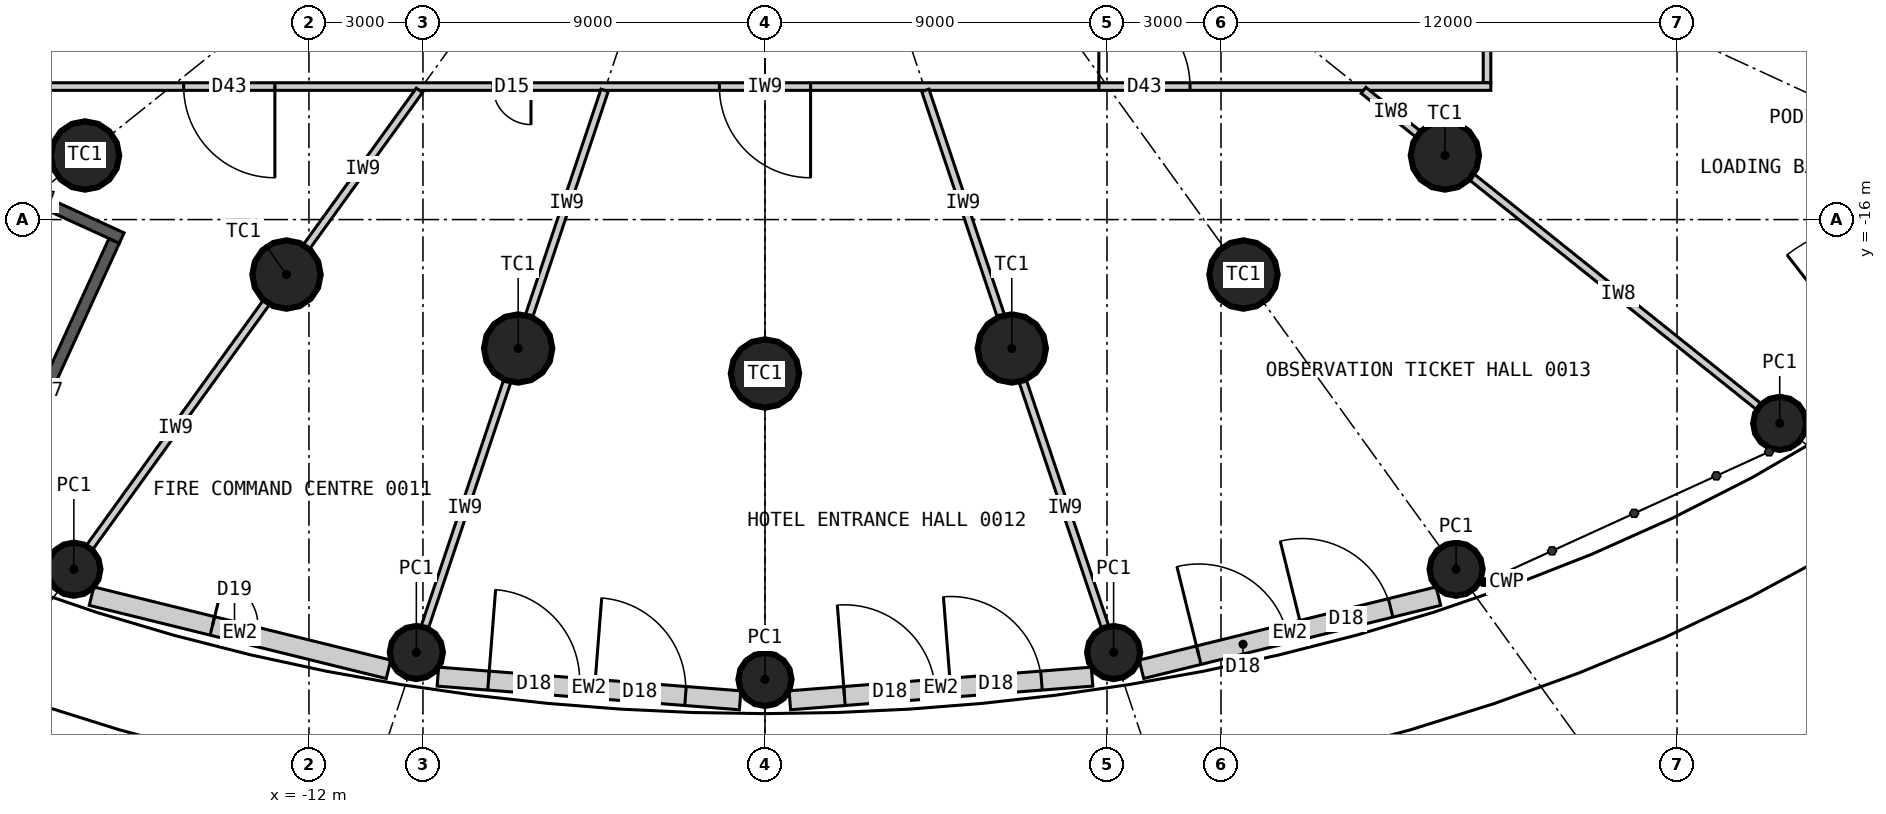
"""IFC4 building model, lengths in metres.
Left out: names, types, materials, properties, quantities, classifications, styles, units other than length and angle.
Written with IfcOpenShell. Run it as: python <this file> out.ifc"""

import sys

from ifc_helpers import new_model, si_unit, direction, frame, frame_2d, origin, origin_2d, place, context, subcontext, project, spatial, rectangle, circle, extrude, element, fill, save


model = new_model("IFC4")
c1 = context("Model", 3, precision=1e-05, world=origin(), true_north=direction((0.0, 1.0)))
c2 = subcontext(c1, "Body", "Model", "MODEL_VIEW")
j1 = project(units=[si_unit("LENGTHUNIT", "METRE"), si_unit("PLANEANGLEUNIT", "RADIAN")], contexts=[c1])
p1 = place(None, origin())
s1 = spatial("IfcSite", under=j1, at=p1, CompositionType="ELEMENT")
p2 = place(p1, origin())
s2 = spatial("IfcBuilding", under=s1, at=p2, CompositionType="ELEMENT")
p3 = place(p2, origin())
s3 = spatial("IfcBuildingStorey", under=s2, at=p3, CompositionType="ELEMENT", Elevation=0.0)
for number, where, z_axis, x_axis in (
    (1, (-17.892, -14.313, 0.0), (0.0, 0.0, 1.0), (1.0, 0.0, 0.0)),
    (2, (-12.591, -17.447, 0.0), (0.0, 0.0, 1.0), (1.0, 0.0, 0.0)),
    (3, (-6.495, -19.391, 0.0), (0.0, 0.0, 1.0), (1.0, 0.0, 0.0)),
    (4, (0.0, -20.05, 0.0), (0.0, 0.0, 1.0), (1.0, 0.0, 0.0)),
    (5, (6.495, -19.391, 0.0), (0.0, 0.0, 1.0), (1.0, 0.0, 0.0)),
    (6, (12.591, -17.447, 0.0), (0.0, 0.0, 1.0), (1.0, 0.0, 0.0)),
    (7, (17.892, -14.313, 0.0), (0.0, 0.0, 1.0), (1.0, 0.0, 0.0)),
):
    element("IfcColumn", number, at=place(p3, frame(where, z_axis=z_axis, x_axis=x_axis)), inside=s3, PredefinedType="COLUMN", context=c2, shape_type="SweptSolid", body=[
        extrude(circle(Radius=0.9, at=origin_2d()), origin(), (0.0, 0.0, 1.0), 7.2),
    ])
for number, where, z_axis, x_axis in (
    (8, (-18.186, -25.199, 0.0), (0.0, 0.0, 1.0), (1.0, 0.0, 0.0)),
    (9, (-9.174, -27.391, 0.0), (0.0, 0.0, 1.0), (1.0, 0.0, 0.0)),
    (10, (0.0, -28.1, 0.0), (0.0, 0.0, 1.0), (1.0, 0.0, 0.0)),
    (11, (9.174, -27.391, 0.0), (0.0, 0.0, 1.0), (1.0, 0.0, 0.0)),
    (12, (18.186, -25.199, 0.0), (0.0, 0.0, 1.0), (1.0, 0.0, 0.0)),
    (13, (26.702, -21.362, 0.0), (0.0, 0.0, 1.0), (1.0, 0.0, 0.0)),
):
    element("IfcColumn", number, at=place(p3, frame(where, z_axis=z_axis, x_axis=x_axis)), inside=s3, PredefinedType="COLUMN", context=c2, shape_type="SweptSolid", body=[
        extrude(circle(Radius=0.7, at=origin_2d()), origin(), (0.0, 0.0, 1.0), 7.2),
    ])
p4 = place(p3, frame((-17.721, -25.908, 0.0), z_axis=(0.0, 0.0, 1.0), x_axis=(0.970964815964, -0.23922233625, 0.0)))
e14 = element("IfcWall", 14, at=p4, inside=s3, PredefinedType="SOLIDWALL", context=c2, shape_type="SweptSolid", body=[
    extrude(rectangle(XDim=8.048, YDim=0.5, at=frame_2d((4.024, 0.0))), origin(), (0.0, 0.0, 1.0), 6.95),
])
p5 = place(p4, frame((3.275, 0.0, 0.0)))
e15 = element("IfcOpeningElement", 15, at=p5, cuts=e14, PredefinedType="OPENING", context=c2, shape_type="SweptSolid", body=[
    extrude(rectangle(XDim=1.2, YDim=2.4, at=frame_2d((0.6, 1.2))), frame((0.0, 0.26, 0.0), z_axis=(0.0, -1.0, 0.0), x_axis=(1.0, 0.0, 0.0)), (0.0, 0.0, 1.0), 0.52),
])
p6 = place(p3, frame((-8.608, -28.026, 0.0), z_axis=(0.0, 0.0, 1.0), x_axis=(0.996950620384, -0.078034995456, 0.0)))
e16 = element("IfcWall", 16, at=p6, inside=s3, PredefinedType="SOLIDWALL", context=c2, shape_type="SweptSolid", body=[
    extrude(rectangle(XDim=7.978, YDim=0.5, at=frame_2d((3.989, 0.0))), origin(), (0.0, 0.0, 1.0), 6.95),
])
p7 = place(p6, frame((1.336, 0.0, 0.0)))
e17 = element("IfcOpeningElement", 17, at=p7, cuts=e16, PredefinedType="OPENING", context=c2, shape_type="SweptSolid", body=[
    extrude(rectangle(XDim=2.4, YDim=3.0, at=frame_2d((1.2, 1.5))), frame((0.0, 0.26, 0.0), z_axis=(0.0, -1.0, 0.0), x_axis=(1.0, 0.0, 0.0)), (0.0, 0.0, 1.0), 0.52),
])
p8 = place(p6, frame((4.136, 0.0, 0.0)))
e18 = element("IfcOpeningElement", 18, at=p8, cuts=e16, PredefinedType="OPENING", context=c2, shape_type="SweptSolid", body=[
    extrude(rectangle(XDim=2.4, YDim=3.0, at=frame_2d((1.2, 1.5))), frame((0.0, 0.26, 0.0), z_axis=(0.0, -1.0, 0.0), x_axis=(1.0, 0.0, 0.0)), (0.0, 0.0, 1.0), 0.52),
])
p9 = place(p3, frame((0.654, -28.649, 0.0), z_axis=(0.0, 0.0, 1.0), x_axis=(0.996950620384, 0.078034995456, 0.0)))
e19 = element("IfcWall", 19, at=p9, inside=s3, PredefinedType="SOLIDWALL", context=c2, shape_type="SweptSolid", body=[
    extrude(rectangle(XDim=7.978, YDim=0.5, at=frame_2d((3.989, 0.0))), origin(), (0.0, 0.0, 1.0), 6.95),
])
p10 = place(p9, frame((1.442, 0.0, 0.0)))
e20 = element("IfcOpeningElement", 20, at=p10, cuts=e19, PredefinedType="OPENING", context=c2, shape_type="SweptSolid", body=[
    extrude(rectangle(XDim=2.4, YDim=3.0, at=frame_2d((1.2, 1.5))), frame((0.0, 0.26, 0.0), z_axis=(0.0, -1.0, 0.0), x_axis=(1.0, 0.0, 0.0)), (0.0, 0.0, 1.0), 0.52),
])
p11 = place(p9, frame((4.242, 0.0, 0.0)))
e21 = element("IfcOpeningElement", 21, at=p11, cuts=e19, PredefinedType="OPENING", context=c2, shape_type="SweptSolid", body=[
    extrude(rectangle(XDim=2.4, YDim=3.0, at=frame_2d((1.2, 1.5))), frame((0.0, 0.26, 0.0), z_axis=(0.0, -1.0, 0.0), x_axis=(1.0, 0.0, 0.0)), (0.0, 0.0, 1.0), 0.52),
])
p12 = place(p3, frame((9.907, -27.833, 0.0), z_axis=(0.0, 0.0, 1.0), x_axis=(0.970964815964, 0.23922233625, 0.0)))
e22 = element("IfcWall", 22, at=p12, inside=s3, PredefinedType="SOLIDWALL", context=c2, shape_type="SweptSolid", body=[
    extrude(rectangle(XDim=8.048, YDim=0.5, at=frame_2d((4.024, 0.0))), origin(), (0.0, 0.0, 1.0), 6.95),
])
p13 = place(p12, frame((1.553, 0.0, 0.0)))
e23 = element("IfcOpeningElement", 23, at=p13, cuts=e22, PredefinedType="OPENING", context=c2, shape_type="SweptSolid", body=[
    extrude(rectangle(XDim=2.4, YDim=3.0, at=frame_2d((1.2, 1.5))), frame((0.0, 0.26, 0.0), z_axis=(0.0, -1.0, 0.0), x_axis=(1.0, 0.0, 0.0)), (0.0, 0.0, 1.0), 0.52),
])
p14 = place(p12, frame((4.353, 0.0, 0.0)))
e24 = element("IfcOpeningElement", 24, at=p14, cuts=e22, PredefinedType="OPENING", context=c2, shape_type="SweptSolid", body=[
    extrude(rectangle(XDim=2.4, YDim=3.0, at=frame_2d((1.2, 1.5))), frame((0.0, 0.26, 0.0), z_axis=(0.0, -1.0, 0.0), x_axis=(1.0, 0.0, 0.0)), (0.0, 0.0, 1.0), 0.52),
])
p15 = place(p3, frame((19.0, -12.4, 0.0), z_axis=(0.0, 0.0, 1.0), x_axis=(0.0, 1.0, 0.0)))
e25 = element("IfcWall", 25, at=p15, inside=s3, PredefinedType="PARTITIONING", context=c2, shape_type="SweptSolid", body=[
    extrude(rectangle(XDim=24.8, YDim=0.2, at=frame_2d((12.4, 0.0))), origin(), (0.0, 0.0, 1.0), 6.95),
])
p16 = place(p15, frame((11.2, 0.0, 0.0)))
e26 = element("IfcOpeningElement", 26, at=p16, cuts=e25, PredefinedType="OPENING", context=c2, shape_type="SweptSolid", body=[
    extrude(rectangle(XDim=2.4, YDim=3.0, at=frame_2d((1.2, 1.5))), frame((0.0, 0.11, 0.0), z_axis=(0.0, -1.0, 0.0), x_axis=(1.0, 0.0, 0.0)), (0.0, 0.0, 1.0), 0.22),
])
p17 = place(p15, frame((3.153, 0.0, 0.0)))
e27 = element("IfcOpeningElement", 27, at=p17, cuts=e25, PredefinedType="OPENING", context=c2, shape_type="SweptSolid", body=[
    extrude(rectangle(XDim=1.8, YDim=2.4, at=frame_2d((0.9, 1.2))), frame((0.0, 0.11, 0.0), z_axis=(0.0, -1.0, 0.0), x_axis=(1.0, 0.0, 0.0)), (0.0, 0.0, 1.0), 0.22),
])
p18 = place(p15, frame((17.094, 0.0, 0.0)))
e28 = element("IfcOpeningElement", 28, at=p18, cuts=e25, PredefinedType="OPENING", context=c2, shape_type="SweptSolid", body=[
    extrude(rectangle(XDim=1.8, YDim=2.4, at=frame_2d((0.9, 1.2))), frame((0.0, 0.11, 0.0), z_axis=(0.0, -1.0, 0.0), x_axis=(1.0, 0.0, 0.0)), (0.0, 0.0, 1.0), 0.22),
])
p19 = place(p3, frame((19.1, -12.5, 0.0), z_axis=(0.0, 0.0, 1.0), x_axis=(-1.0, 0.0, 0.0)))
e29 = element("IfcWall", 29, at=p19, inside=s3, PredefinedType="PARTITIONING", context=c2, shape_type="SweptSolid", body=[
    extrude(rectangle(XDim=38.2, YDim=0.2, at=frame_2d((19.1, 0.0))), origin(), (0.0, 0.0, 1.0), 6.95),
])
p20 = place(p19, frame((31.997, 0.0, 0.0)))
e30 = element("IfcOpeningElement", 30, at=p20, cuts=e29, PredefinedType="OPENING", context=c2, shape_type="SweptSolid", body=[
    extrude(rectangle(XDim=2.4, YDim=3.0, at=frame_2d((1.2, 1.5))), frame((0.0, 0.11, 0.0), z_axis=(0.0, -1.0, 0.0), x_axis=(1.0, 0.0, 0.0)), (0.0, 0.0, 1.0), 0.22),
])
p21 = place(p19, frame((25.257, 0.0, 0.0)))
e31 = element("IfcOpeningElement", 31, at=p21, cuts=e29, PredefinedType="OPENING", context=c2, shape_type="SweptSolid", body=[
    extrude(rectangle(XDim=1.0, YDim=2.2, at=frame_2d((0.5, 1.1))), frame((0.0, 0.11, 0.0), z_axis=(0.0, -1.0, 0.0), x_axis=(1.0, 0.0, 0.0)), (0.0, 0.0, 1.0), 0.22),
])
p22 = place(p19, frame((17.9, 0.0, 0.0)))
e32 = element("IfcOpeningElement", 32, at=p22, cuts=e29, PredefinedType="OPENING", context=c2, shape_type="SweptSolid", body=[
    extrude(rectangle(XDim=2.4, YDim=3.0, at=frame_2d((1.2, 1.5))), frame((0.0, 0.11, 0.0), z_axis=(0.0, -1.0, 0.0), x_axis=(1.0, 0.0, 0.0)), (0.0, 0.0, 1.0), 0.22),
])
p23 = place(p19, frame((7.915, 0.0, 0.0)))
e33 = element("IfcOpeningElement", 33, at=p23, cuts=e29, PredefinedType="OPENING", context=c2, shape_type="SweptSolid", body=[
    extrude(rectangle(XDim=2.4, YDim=3.0, at=frame_2d((1.2, 1.5))), frame((0.0, 0.11, 0.0), z_axis=(0.0, -1.0, 0.0), x_axis=(1.0, 0.0, 0.0)), (0.0, 0.0, 1.0), 0.22),
])
p24 = place(p3, frame((-9.093, -12.6, 0.0), z_axis=(0.0, 0.0, 1.0), x_axis=(-0.58522538525, -0.810870673079, 0.0)))
e34 = element("IfcWall", 34, at=p24, inside=s3, PredefinedType="PARTITIONING", context=c2, shape_type="SweptSolid", body=[
    extrude(rectangle(XDim=5.077, YDim=0.2, at=frame_2d((2.538, 0.0))), origin(), (0.0, 0.0, 1.0), 6.1),
])
p25 = place(p3, frame((-13.118, -18.176, 0.0), z_axis=(0.0, 0.0, 1.0), x_axis=(-0.585204349301, -0.810885854828, 0.0)))
e35 = element("IfcWall", 35, at=p25, inside=s3, PredefinedType="PARTITIONING", context=c2, shape_type="SweptSolid", body=[
    extrude(rectangle(XDim=8.161, YDim=0.2, at=frame_2d((4.081, 0.0))), origin(), (0.0, 0.0, 1.0), 6.05),
])
p26 = place(p3, frame((-4.22, -12.6, 0.0), z_axis=(0.0, 0.0, 1.0), x_axis=(-0.317584173452, -0.9482300843, 0.0)))
e36 = element("IfcWall", 36, at=p26, inside=s3, PredefinedType="PARTITIONING", context=c2, shape_type="SweptSolid", body=[
    extrude(rectangle(XDim=6.262, YDim=0.2, at=frame_2d((3.131, 0.0))), origin(), (0.0, 0.0, 1.0), 6.1),
])
p27 = place(p3, frame((-6.781, -20.245, 0.0), z_axis=(0.0, 0.0, 1.0), x_axis=(-0.317580622989, -0.948231273425, 0.0)))
e37 = element("IfcWall", 37, at=p27, inside=s3, PredefinedType="PARTITIONING", context=c2, shape_type="SweptSolid", body=[
    extrude(rectangle(XDim=7.036, YDim=0.2, at=frame_2d((3.518, 0.0))), origin(), (0.0, 0.0, 1.0), 6.05),
])
p28 = place(p3, frame((4.22, -12.6, 0.0), z_axis=(0.0, 0.0, 1.0), x_axis=(0.317584173452, -0.9482300843, 0.0)))
e38 = element("IfcWall", 38, at=p28, inside=s3, PredefinedType="PARTITIONING", context=c2, shape_type="SweptSolid", body=[
    extrude(rectangle(XDim=6.262, YDim=0.2, at=frame_2d((3.131, 0.0))), origin(), (0.0, 0.0, 1.0), 6.1),
])
p29 = place(p3, frame((6.781, -20.245, 0.0), z_axis=(0.0, 0.0, 1.0), x_axis=(0.317580622989, -0.948231273425, 0.0)))
e39 = element("IfcWall", 39, at=p29, inside=s3, PredefinedType="PARTITIONING", context=c2, shape_type="SweptSolid", body=[
    extrude(rectangle(XDim=7.036, YDim=0.2, at=frame_2d((3.518, 0.0))), origin(), (0.0, 0.0, 1.0), 6.05),
])
p30 = place(p3, frame((15.75, -12.6, 0.0), z_axis=(0.0, 0.0, 1.0), x_axis=(0.780881734892, -0.6246788904, 0.0)))
e40 = element("IfcWall", 40, at=p30, inside=s3, PredefinedType="PARTITIONING", context=c2, shape_type="SweptSolid", body=[
    extrude(rectangle(XDim=1.843, YDim=0.2, at=frame_2d((0.921, 0.0))), origin(), (0.0, 0.0, 1.0), 6.1),
])
p31 = place(p3, frame((18.594, -14.875, 0.0), z_axis=(0.0, 0.0, 1.0), x_axis=(0.780868809443, -0.624695047554, 0.0)))
e41 = element("IfcWall", 41, at=p31, inside=s3, PredefinedType="PARTITIONING", context=c2, shape_type="SweptSolid", body=[
    extrude(rectangle(XDim=9.883, YDim=0.2, at=frame_2d((4.941, 0.0))), origin(), (0.0, 0.0, 1.0), 6.05),
])
p32 = place(p3, frame((-20.722, -24.437, 0.0), z_axis=(0.0, 0.0, 1.0), x_axis=(0.415348644036, 0.909662302119, 0.0)))
e42 = element("IfcWall", 42, at=p32, inside=s3, PredefinedType="SHEAR", context=c2, shape_type="SweptSolid", body=[
    extrude(rectangle(XDim=8.66, YDim=0.3, at=frame_2d((4.33, 0.0))), origin(), (0.0, 0.0, 1.0), 6.95),
])
p33 = place(p3, frame((-21.293, -14.492, 0.0), z_axis=(0.0, 0.0, 1.0), x_axis=(0.90966669911, -0.415339013975, 0.0)))
e43 = element("IfcWall", 43, at=p33, inside=s3, PredefinedType="SHEAR", context=c2, shape_type="SweptSolid", body=[
    extrude(rectangle(XDim=4.8, YDim=0.3, at=frame_2d((2.4, 0.0))), origin(), (0.0, 0.0, 1.0), 6.95),
])
p34 = place(p5, origin())
e44 = element("IfcDoor", 44, at=p34, inside=s3, OperationType="SINGLE_SWING_LEFT", PredefinedType="DOOR", context=c2, shape_type="SweptSolid", body=[
    extrude(rectangle(XDim=1.2, YDim=2.4, at=frame_2d((0.6, 1.2))), frame((0.0, 0.025, 0.0), z_axis=(0.0, -1.0, 0.0), x_axis=(1.0, 0.0, 0.0)), (0.0, 0.0, 1.0), 0.05),
])
fill(e15, e44)
p35 = place(p7, origin())
e45 = element("IfcDoor", 45, at=p35, inside=s3, OperationType="DOUBLE_DOOR_DOUBLE_SWING", PredefinedType="DOOR", context=c2, shape_type="SweptSolid", body=[
    extrude(rectangle(XDim=2.4, YDim=3.0, at=frame_2d((1.2, 1.5))), frame((0.0, 0.025, 0.0), z_axis=(0.0, -1.0, 0.0), x_axis=(1.0, 0.0, 0.0)), (0.0, 0.0, 1.0), 0.05),
])
fill(e17, e45)
p36 = place(p8, origin())
e46 = element("IfcDoor", 46, at=p36, inside=s3, OperationType="DOUBLE_DOOR_DOUBLE_SWING", PredefinedType="DOOR", context=c2, shape_type="SweptSolid", body=[
    extrude(rectangle(XDim=2.4, YDim=3.0, at=frame_2d((1.2, 1.5))), frame((0.0, 0.025, 0.0), z_axis=(0.0, -1.0, 0.0), x_axis=(1.0, 0.0, 0.0)), (0.0, 0.0, 1.0), 0.05),
])
fill(e18, e46)
p37 = place(p10, origin())
e47 = element("IfcDoor", 47, at=p37, inside=s3, OperationType="DOUBLE_DOOR_DOUBLE_SWING", PredefinedType="DOOR", context=c2, shape_type="SweptSolid", body=[
    extrude(rectangle(XDim=2.4, YDim=3.0, at=frame_2d((1.2, 1.5))), frame((0.0, 0.025, 0.0), z_axis=(0.0, -1.0, 0.0), x_axis=(1.0, 0.0, 0.0)), (0.0, 0.0, 1.0), 0.05),
])
fill(e20, e47)
p38 = place(p11, origin())
e48 = element("IfcDoor", 48, at=p38, inside=s3, OperationType="DOUBLE_DOOR_DOUBLE_SWING", PredefinedType="DOOR", context=c2, shape_type="SweptSolid", body=[
    extrude(rectangle(XDim=2.4, YDim=3.0, at=frame_2d((1.2, 1.5))), frame((0.0, 0.025, 0.0), z_axis=(0.0, -1.0, 0.0), x_axis=(1.0, 0.0, 0.0)), (0.0, 0.0, 1.0), 0.05),
])
fill(e21, e48)
p39 = place(p13, origin())
e49 = element("IfcDoor", 49, at=p39, inside=s3, OperationType="DOUBLE_DOOR_DOUBLE_SWING", PredefinedType="DOOR", context=c2, shape_type="SweptSolid", body=[
    extrude(rectangle(XDim=2.4, YDim=3.0, at=frame_2d((1.2, 1.5))), frame((0.0, 0.025, 0.0), z_axis=(0.0, -1.0, 0.0), x_axis=(1.0, 0.0, 0.0)), (0.0, 0.0, 1.0), 0.05),
])
fill(e23, e49)
p40 = place(p14, origin())
e50 = element("IfcDoor", 50, at=p40, inside=s3, OperationType="DOUBLE_DOOR_DOUBLE_SWING", PredefinedType="DOOR", context=c2, shape_type="SweptSolid", body=[
    extrude(rectangle(XDim=2.4, YDim=3.0, at=frame_2d((1.2, 1.5))), frame((0.0, 0.025, 0.0), z_axis=(0.0, -1.0, 0.0), x_axis=(1.0, 0.0, 0.0)), (0.0, 0.0, 1.0), 0.05),
])
fill(e24, e50)
p41 = place(p20, origin())
e51 = element("IfcDoor", 51, at=p41, inside=s3, OperationType="DOUBLE_DOOR_DOUBLE_SWING", PredefinedType="DOOR", context=c2, shape_type="SweptSolid", body=[
    extrude(rectangle(XDim=2.4, YDim=3.0, at=frame_2d((1.2, 1.5))), frame((0.0, 0.025, 0.0), z_axis=(0.0, -1.0, 0.0), x_axis=(1.0, 0.0, 0.0)), (0.0, 0.0, 1.0), 0.05),
])
fill(e30, e51)
p42 = place(p21, origin())
e52 = element("IfcDoor", 52, at=p42, inside=s3, OperationType="SINGLE_SWING_LEFT", PredefinedType="DOOR", context=c2, shape_type="SweptSolid", body=[
    extrude(rectangle(XDim=1.0, YDim=2.2, at=frame_2d((0.5, 1.1))), frame((0.0, 0.025, 0.0), z_axis=(0.0, -1.0, 0.0), x_axis=(1.0, 0.0, 0.0)), (0.0, 0.0, 1.0), 0.05),
])
fill(e31, e52)
p43 = place(p22, origin())
e53 = element("IfcDoor", 53, at=p43, inside=s3, OperationType="DOUBLE_DOOR_DOUBLE_SWING", PredefinedType="DOOR", context=c2, shape_type="SweptSolid", body=[
    extrude(rectangle(XDim=2.4, YDim=3.0, at=frame_2d((1.2, 1.5))), frame((0.0, 0.025, 0.0), z_axis=(0.0, -1.0, 0.0), x_axis=(1.0, 0.0, 0.0)), (0.0, 0.0, 1.0), 0.05),
])
fill(e32, e53)
p44 = place(p23, origin())
e54 = element("IfcDoor", 54, at=p44, inside=s3, OperationType="DOUBLE_DOOR_DOUBLE_SWING", PredefinedType="DOOR", context=c2, shape_type="SweptSolid", body=[
    extrude(rectangle(XDim=2.4, YDim=3.0, at=frame_2d((1.2, 1.5))), frame((0.0, 0.025, 0.0), z_axis=(0.0, -1.0, 0.0), x_axis=(1.0, 0.0, 0.0)), (0.0, 0.0, 1.0), 0.05),
])
fill(e33, e54)
save(model, sys.argv[1])
